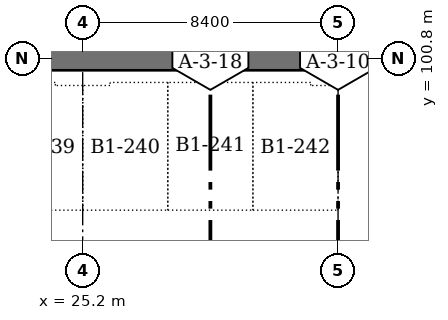
"""IFC4 building model, lengths in metres.
Left out: names, types, materials, properties, quantities, classifications, styles, units other than length and angle.
Written with IfcOpenShell. Run it as: python <this file> out.ifc"""

import sys

from ifc_helpers import new_model, si_unit, direction, frame, frame_2d, origin, place, context, subcontext, project, spatial, rectangle, extrude, element, save


model = new_model("IFC4")
c1 = context("Model", 3, precision=1e-05, world=origin(), true_north=direction((0.0, 1.0)))
c2 = subcontext(c1, "Body", "Model", "MODEL_VIEW")
j1 = project(units=[si_unit("LENGTHUNIT", "METRE"), si_unit("PLANEANGLEUNIT", "RADIAN")], contexts=[c1])
p1 = place(None, origin())
s1 = spatial("IfcSite", under=j1, at=p1, CompositionType="ELEMENT")
p2 = place(p1, origin())
s2 = spatial("IfcBuilding", under=s1, at=p2, CompositionType="ELEMENT")
p3 = place(p2, frame((0.0, 0.0, -4.0)))
s3 = spatial("IfcBuildingStorey", under=s2, at=p3, CompositionType="ELEMENT", Elevation=-4.0)
p4 = place(p3, frame((-8.8, 100.8, 0.0), z_axis=(0.0, 0.0, 1.0), x_axis=(1.0, 0.0, 0.0)))
e1 = element("IfcWall", 1, at=p4, inside=s3, PredefinedType="SOLIDWALL", context=c2, shape_type="SweptSolid", body=[
    extrude(rectangle(XDim=135.2, YDim=0.8, at=frame_2d((67.6, 0.0))), origin(), (0.0, 0.0, 1.0), 3.6),
])
save(model, sys.argv[1])
